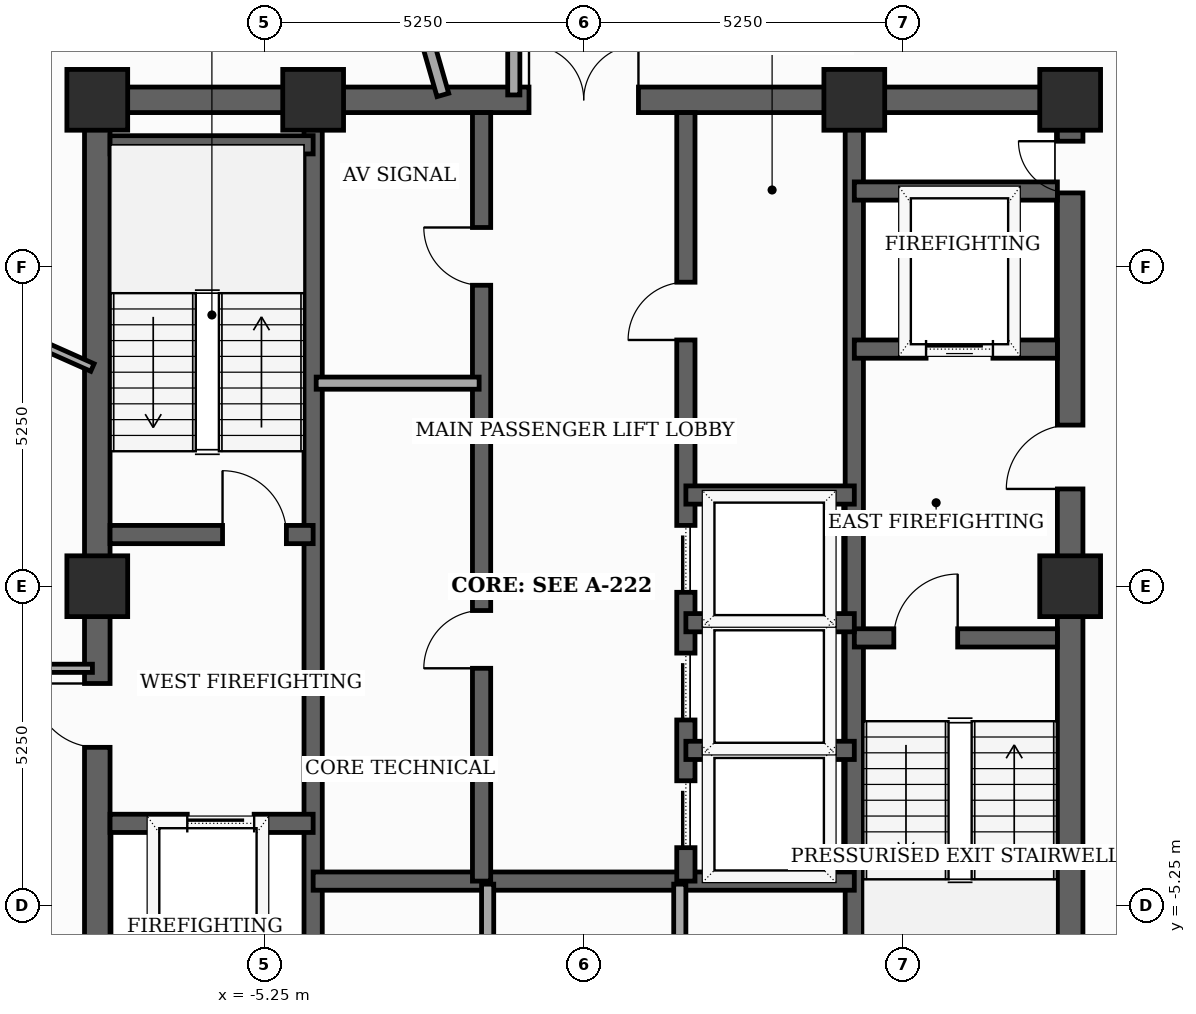
"""IFC4 building model, lengths in metres.
Left out: names, types, materials, properties, quantities, classifications, styles, units other than length and angle.
Written with IfcOpenShell. Run it as: python <this file> out.ifc"""

import sys

from ifc_helpers import new_model, si_unit, direction, frame, frame_2d, origin, origin_2d, place, context, subcontext, project, spatial, rectangle, extrude, element, fill, save


model = new_model("IFC4")
c1 = context("Model", 3, precision=1e-05, world=origin(), true_north=direction((0.0, 1.0)))
c2 = subcontext(c1, "Body", "Model", "MODEL_VIEW")
j1 = project(units=[si_unit("LENGTHUNIT", "METRE"), si_unit("PLANEANGLEUNIT", "RADIAN")], contexts=[c1])
p1 = place(None, origin())
s1 = spatial("IfcSite", under=j1, at=p1, CompositionType="ELEMENT")
p2 = place(p1, origin())
s2 = spatial("IfcBuilding", under=s1, at=p2, CompositionType="ELEMENT")
p3 = place(p2, frame((0.0, 0.0, 298.0)))
s3 = spatial("IfcBuildingStorey", under=s2, at=p3, CompositionType="ELEMENT", Elevation=298.0)
for number, where, z_axis, x_axis in (
    (1, (8.0, 0.0, 0.0), (0.0, 0.0, 1.0), (1.0, 0.0, 0.0)),
    (2, (8.0, 8.0, 0.0), (0.0, 0.0, 1.0), (1.0, 0.0, 0.0)),
    (3, (4.45, 8.0, 0.0), (0.0, 0.0, 1.0), (1.0, 0.0, 0.0)),
    (4, (-4.45, 8.0, 0.0), (0.0, 0.0, 1.0), (1.0, 0.0, 0.0)),
    (5, (-8.0, 8.0, 0.0), (0.0, 0.0, 1.0), (1.0, 0.0, 0.0)),
    (6, (-8.0, 0.0, 0.0), (0.0, 0.0, 1.0), (1.0, 0.0, 0.0)),
):
    element("IfcColumn", number, at=place(p3, frame(where, z_axis=z_axis, x_axis=x_axis)), inside=s3, PredefinedType="COLUMN", context=c2, shape_type="SweptSolid", body=[
        extrude(rectangle(XDim=1.0, YDim=1.0, at=origin_2d()), origin(), (0.0, 0.0, 1.0), 3.7),
    ])
p4 = place(p3, frame((-8.0, -8.0, 0.0), z_axis=(0.0, 0.0, 1.0), x_axis=(0.0, 1.0, 0.0)))
e7 = element("IfcWall", 7, at=p4, inside=s3, PredefinedType="SHEAR", context=c2, shape_type="SweptSolid", body=[
    extrude(rectangle(XDim=16.0, YDim=0.42, at=frame_2d((8.0, 0.0))), origin(), (0.0, 0.0, 1.0), 3.5),
])
p5 = place(p4, frame((0.681, 0.0, 0.0)))
e8 = element("IfcOpeningElement", 8, at=p5, cuts=e7, PredefinedType="OPENING", context=c2, shape_type="SweptSolid", body=[
    extrude(rectangle(XDim=0.85, YDim=2.02, at=frame_2d((0.425, 1.01))), frame((0.0, 0.22, 0.0), z_axis=(0.0, -1.0, 0.0), x_axis=(1.0, 0.0, 0.0)), (0.0, 0.0, 1.0), 0.44),
])
p6 = place(p4, frame((5.35, 0.0, 0.0)))
e9 = element("IfcOpeningElement", 9, at=p6, cuts=e7, PredefinedType="OPENING", context=c2, shape_type="SweptSolid", body=[
    extrude(rectangle(XDim=1.05, YDim=2.15, at=frame_2d((0.525, 1.075))), frame((0.0, 0.22, 0.0), z_axis=(0.0, -1.0, 0.0), x_axis=(1.0, 0.0, 0.0)), (0.0, 0.0, 1.0), 0.44),
])
p7 = place(p3, frame((8.0, -8.0, 0.0), z_axis=(0.0, 0.0, 1.0), x_axis=(0.0, 1.0, 0.0)))
e10 = element("IfcWall", 10, at=p7, inside=s3, PredefinedType="SHEAR", context=c2, shape_type="SweptSolid", body=[
    extrude(rectangle(XDim=16.0, YDim=0.42, at=frame_2d((8.0, 0.0))), origin(), (0.0, 0.0, 1.0), 3.5),
])
p8 = place(p7, frame((9.6, 0.0, 0.0)))
e11 = element("IfcOpeningElement", 11, at=p8, cuts=e10, PredefinedType="OPENING", context=c2, shape_type="SweptSolid", body=[
    extrude(rectangle(XDim=1.05, YDim=2.15, at=frame_2d((0.525, 1.075))), frame((0.0, 0.22, 0.0), z_axis=(0.0, -1.0, 0.0), x_axis=(1.0, 0.0, 0.0)), (0.0, 0.0, 1.0), 0.44),
])
p9 = place(p7, frame((14.469, 0.0, 0.0)))
e12 = element("IfcOpeningElement", 12, at=p9, cuts=e10, PredefinedType="OPENING", context=c2, shape_type="SweptSolid", body=[
    extrude(rectangle(XDim=0.85, YDim=2.02, at=frame_2d((0.425, 1.01))), frame((0.0, 0.22, 0.0), z_axis=(0.0, -1.0, 0.0), x_axis=(1.0, 0.0, 0.0)), (0.0, 0.0, 1.0), 0.44),
])
p10 = place(p3, frame((-8.0, 8.0, 0.0), z_axis=(0.0, 0.0, 1.0), x_axis=(1.0, 0.0, 0.0)))
e13 = element("IfcWall", 13, at=p10, inside=s3, PredefinedType="SHEAR", context=c2, shape_type="SweptSolid", body=[
    extrude(rectangle(XDim=16.0, YDim=0.42, at=frame_2d((8.0, 0.0))), origin(), (0.0, 0.0, 1.0), 3.5),
])
p11 = place(p10, frame((7.1, 0.0, 0.0)))
e14 = element("IfcOpeningElement", 14, at=p11, cuts=e13, PredefinedType="OPENING", context=c2, shape_type="SweptSolid", body=[
    extrude(rectangle(XDim=1.8, YDim=2.15, at=frame_2d((0.9, 1.075))), frame((0.0, 0.22, 0.0), z_axis=(0.0, -1.0, 0.0), x_axis=(1.0, 0.0, 0.0)), (0.0, 0.0, 1.0), 0.44),
])
for number, where, z_axis, x_axis in (
    (15, (-4.45, -7.79, 0.0), (0.0, 0.0, 1.0), (0.0, 1.0, 0.0)),
    (16, (4.45, -7.79, 0.0), (0.0, 0.0, 1.0), (0.0, 1.0, 0.0)),
):
    element("IfcWall", number, at=place(p3, frame(where, z_axis=z_axis, x_axis=x_axis)), inside=s3, PredefinedType="SHEAR", context=c2, shape_type="SweptSolid", body=[
        extrude(rectangle(XDim=15.58, YDim=0.3, at=frame_2d((7.79, 0.0))), origin(), (0.0, 0.0, 1.0), 3.5),
    ])
p12 = place(p3, frame((-7.79, 0.85, 0.0), z_axis=(0.0, 0.0, 1.0), x_axis=(1.0, 0.0, 0.0)))
e17 = element("IfcWall", 17, at=p12, inside=s3, PredefinedType="SHEAR", context=c2, shape_type="SweptSolid", body=[
    extrude(rectangle(XDim=3.34, YDim=0.3, at=frame_2d((1.67, 0.0))), origin(), (0.0, 0.0, 1.0), 3.5),
])
p13 = place(p12, frame((1.85, 0.0, 0.0)))
e18 = element("IfcOpeningElement", 18, at=p13, cuts=e17, PredefinedType="OPENING", context=c2, shape_type="SweptSolid", body=[
    extrude(rectangle(XDim=1.05, YDim=2.15, at=frame_2d((0.525, 1.075))), frame((0.0, 0.16, 0.0), z_axis=(0.0, -1.0, 0.0), x_axis=(1.0, 0.0, 0.0)), (0.0, 0.0, 1.0), 0.32),
])
p14 = place(p3, frame((-7.79, 7.26, 0.0), z_axis=(0.0, 0.0, 1.0), x_axis=(1.0, 0.0, 0.0)))
e19 = element("IfcWall", 19, at=p14, inside=s3, PredefinedType="SHEAR", context=c2, shape_type="SweptSolid", body=[
    extrude(rectangle(XDim=3.34, YDim=0.3, at=frame_2d((1.67, 0.0))), origin(), (0.0, 0.0, 1.0), 3.5),
])
p15 = place(p3, frame((4.45, -0.85, 0.0), z_axis=(0.0, 0.0, 1.0), x_axis=(1.0, 0.0, 0.0)))
e20 = element("IfcWall", 20, at=p15, inside=s3, PredefinedType="SHEAR", context=c2, shape_type="SweptSolid", body=[
    extrude(rectangle(XDim=3.34, YDim=0.3, at=frame_2d((1.67, 0.0))), origin(), (0.0, 0.0, 1.0), 3.5),
])
p16 = place(p15, frame((0.65, 0.0, 0.0)))
e21 = element("IfcOpeningElement", 21, at=p16, cuts=e20, PredefinedType="OPENING", context=c2, shape_type="SweptSolid", body=[
    extrude(rectangle(XDim=1.05, YDim=2.15, at=frame_2d((0.525, 1.075))), frame((0.0, 0.16, 0.0), z_axis=(0.0, -1.0, 0.0), x_axis=(1.0, 0.0, 0.0)), (0.0, 0.0, 1.0), 0.32),
])
p17 = place(p3, frame((-7.79, -3.9, 0.0), z_axis=(0.0, 0.0, 1.0), x_axis=(1.0, 0.0, 0.0)))
e22 = element("IfcWall", 22, at=p17, inside=s3, PredefinedType="SHEAR", context=c2, shape_type="SweptSolid", body=[
    extrude(rectangle(XDim=3.34, YDim=0.3, at=frame_2d((1.67, 0.0))), origin(), (0.0, 0.0, 1.0), 3.5),
])
p18 = place(p17, frame((1.27, 0.0, 0.0)))
e23 = element("IfcOpeningElement", 23, at=p18, cuts=e22, PredefinedType="OPENING", context=c2, shape_type="SweptSolid", body=[
    extrude(rectangle(XDim=1.1, YDim=2.1, at=frame_2d((0.55, 1.05))), frame((0.0, 0.16, 0.0), z_axis=(0.0, -1.0, 0.0), x_axis=(1.0, 0.0, 0.0)), (0.0, 0.0, 1.0), 0.32),
])
p19 = place(p3, frame((4.45, 3.9, 0.0), z_axis=(0.0, 0.0, 1.0), x_axis=(1.0, 0.0, 0.0)))
e24 = element("IfcWall", 24, at=p19, inside=s3, PredefinedType="SHEAR", context=c2, shape_type="SweptSolid", body=[
    extrude(rectangle(XDim=3.34, YDim=0.3, at=frame_2d((1.67, 0.0))), origin(), (0.0, 0.0, 1.0), 3.5),
])
p20 = place(p19, frame((1.18, 0.0, 0.0)))
e25 = element("IfcOpeningElement", 25, at=p20, cuts=e24, PredefinedType="OPENING", context=c2, shape_type="SweptSolid", body=[
    extrude(rectangle(XDim=1.1, YDim=2.1, at=frame_2d((0.55, 1.05))), frame((0.0, 0.16, 0.0), z_axis=(0.0, -1.0, 0.0), x_axis=(1.0, 0.0, 0.0)), (0.0, 0.0, 1.0), 0.32),
])
p21 = place(p3, frame((4.45, 6.5, 0.0), z_axis=(0.0, 0.0, 1.0), x_axis=(1.0, 0.0, 0.0)))
e26 = element("IfcWall", 26, at=p21, inside=s3, PredefinedType="SHEAR", context=c2, shape_type="SweptSolid", body=[
    extrude(rectangle(XDim=3.34, YDim=0.3, at=frame_2d((1.67, 0.0))), origin(), (0.0, 0.0, 1.0), 3.5),
])
p22 = place(p3, frame((-4.45, -4.85, 0.0), z_axis=(0.0, 0.0, 1.0), x_axis=(1.0, 0.0, 0.0)))
e27 = element("IfcWall", 27, at=p22, inside=s3, PredefinedType="SHEAR", context=c2, shape_type="SweptSolid", body=[
    extrude(rectangle(XDim=8.9, YDim=0.3, at=frame_2d((4.45, 0.0))), origin(), (0.0, 0.0, 1.0), 3.5),
])
p23 = place(p3, frame((-1.68, -4.85, 0.0), z_axis=(0.0, 0.0, 1.0), x_axis=(0.0, 1.0, 0.0)))
e28 = element("IfcWall", 28, at=p23, inside=s3, PredefinedType="SHEAR", context=c2, shape_type="SweptSolid", body=[
    extrude(rectangle(XDim=12.64, YDim=0.3, at=frame_2d((6.32, 0.0))), origin(), (0.0, 0.0, 1.0), 3.5),
])
p24 = place(p23, frame((3.5, 0.0, 0.0)))
e29 = element("IfcOpeningElement", 29, at=p24, cuts=e28, PredefinedType="OPENING", context=c2, shape_type="SweptSolid", body=[
    extrude(rectangle(XDim=0.95, YDim=2.1, at=frame_2d((0.475, 1.05))), frame((0.0, 0.16, 0.0), z_axis=(0.0, -1.0, 0.0), x_axis=(1.0, 0.0, 0.0)), (0.0, 0.0, 1.0), 0.32),
])
p25 = place(p23, frame((9.8, 0.0, 0.0)))
e30 = element("IfcOpeningElement", 30, at=p25, cuts=e28, PredefinedType="OPENING", context=c2, shape_type="SweptSolid", body=[
    extrude(rectangle(XDim=0.95, YDim=2.1, at=frame_2d((0.475, 1.05))), frame((0.0, 0.16, 0.0), z_axis=(0.0, -1.0, 0.0), x_axis=(1.0, 0.0, 0.0)), (0.0, 0.0, 1.0), 0.32),
])
p26 = place(p3, frame((1.68, -4.85, 0.0), z_axis=(0.0, 0.0, 1.0), x_axis=(0.0, 1.0, 0.0)))
e31 = element("IfcWall", 31, at=p26, inside=s3, PredefinedType="SHEAR", context=c2, shape_type="SweptSolid", body=[
    extrude(rectangle(XDim=12.64, YDim=0.3, at=frame_2d((6.32, 0.0))), origin(), (0.0, 0.0, 1.0), 3.5),
])
p27 = place(p26, frame((0.55, 0.0, 0.0)))
e32 = element("IfcOpeningElement", 32, at=p27, cuts=e31, PredefinedType="OPENING", context=c2, shape_type="SweptSolid", body=[
    extrude(rectangle(XDim=1.1, YDim=2.1, at=frame_2d((0.55, 1.05))), frame((0.0, 0.16, 0.0), z_axis=(0.0, -1.0, 0.0), x_axis=(1.0, 0.0, 0.0)), (0.0, 0.0, 1.0), 0.32),
])
p28 = place(p26, frame((2.65, 0.0, 0.0)))
e33 = element("IfcOpeningElement", 33, at=p28, cuts=e31, PredefinedType="OPENING", context=c2, shape_type="SweptSolid", body=[
    extrude(rectangle(XDim=1.1, YDim=2.1, at=frame_2d((0.55, 1.05))), frame((0.0, 0.16, 0.0), z_axis=(0.0, -1.0, 0.0), x_axis=(1.0, 0.0, 0.0)), (0.0, 0.0, 1.0), 0.32),
])
p29 = place(p26, frame((4.75, 0.0, 0.0)))
e34 = element("IfcOpeningElement", 34, at=p29, cuts=e31, PredefinedType="OPENING", context=c2, shape_type="SweptSolid", body=[
    extrude(rectangle(XDim=1.1, YDim=2.1, at=frame_2d((0.55, 1.05))), frame((0.0, 0.16, 0.0), z_axis=(0.0, -1.0, 0.0), x_axis=(1.0, 0.0, 0.0)), (0.0, 0.0, 1.0), 0.32),
])
p30 = place(p26, frame((8.9, 0.0, 0.0)))
e35 = element("IfcOpeningElement", 35, at=p30, cuts=e31, PredefinedType="OPENING", context=c2, shape_type="SweptSolid", body=[
    extrude(rectangle(XDim=0.95, YDim=2.1, at=frame_2d((0.475, 1.05))), frame((0.0, 0.16, 0.0), z_axis=(0.0, -1.0, 0.0), x_axis=(1.0, 0.0, 0.0)), (0.0, 0.0, 1.0), 0.32),
])
for number, where, z_axis, x_axis in (
    (36, (1.68, 1.5, 0.0), (0.0, 0.0, 1.0), (1.0, 0.0, 0.0)),
    (37, (1.68, -2.7, 0.0), (0.0, 0.0, 1.0), (1.0, 0.0, 0.0)),
    (38, (1.68, -0.6, 0.0), (0.0, 0.0, 1.0), (1.0, 0.0, 0.0)),
):
    element("IfcWall", number, at=place(p3, frame(where, z_axis=z_axis, x_axis=x_axis)), inside=s3, PredefinedType="SHEAR", context=c2, shape_type="SweptSolid", body=[
        extrude(rectangle(XDim=2.77, YDim=0.3, at=frame_2d((1.385, 0.0))), origin(), (0.0, 0.0, 1.0), 3.5),
    ])
for number, where, z_axis, x_axis in (
    (39, (-1.58, -7.85, 0.0), (0.0, 0.0, 1.0), (0.0, 1.0, 0.0)),
    (40, (1.58, -7.85, 0.0), (0.0, 0.0, 1.0), (0.0, 1.0, 0.0)),
):
    element("IfcWall", number, at=place(p3, frame(where, z_axis=z_axis, x_axis=x_axis)), inside=s3, PredefinedType="SOLIDWALL", context=c2, shape_type="SweptSolid", body=[
        extrude(rectangle(XDim=2.95, YDim=0.2, at=frame_2d((1.475, 0.0))), origin(), (0.0, 0.0, 1.0), 2.885),
    ])
p31 = place(p3, frame((-4.4, 3.34, 0.0), z_axis=(0.0, 0.0, 1.0), x_axis=(1.0, 0.0, 0.0)))
e41 = element("IfcWall", 41, at=p31, inside=s3, PredefinedType="SOLIDWALL", context=c2, shape_type="SweptSolid", body=[
    extrude(rectangle(XDim=2.68, YDim=0.2, at=frame_2d((1.34, 0.0))), origin(), (0.0, 0.0, 1.0), 3.5),
])
p32 = place(p3, frame((-8.08, -1.35, 0.0), z_axis=(0.0, 0.0, 1.0), x_axis=(-1.0, 0.0, 0.0)))
e42 = element("IfcWall", 42, at=p32, inside=s3, PredefinedType="PARTITIONING", context=c2, shape_type="SweptSolid", body=[
    extrude(rectangle(XDim=2.57, YDim=0.135, at=frame_2d((1.285, 0.0))), origin(), (0.0, 0.0, 1.0), 2.885),
])
p33 = place(p3, frame((-1.15, 10.65, 0.0), z_axis=(0.0, 0.0, 1.0), x_axis=(0.0, -1.0, 0.0)))
e43 = element("IfcWall", 43, at=p33, inside=s3, PredefinedType="SOLIDWALL", context=c2, shape_type="SweptSolid", body=[
    extrude(rectangle(XDim=2.57, YDim=0.2, at=frame_2d((1.285, 0.0))), origin(), (0.0, 0.0, 1.0), 2.885),
])
p34 = place(p3, frame((-8.08, 3.597, 0.0), z_axis=(0.0, 0.0, 1.0), x_axis=(-0.913542590258, 0.406743083266, 0.0)))
e44 = element("IfcWall", 44, at=p34, inside=s3, PredefinedType="PARTITIONING", context=c2, shape_type="SweptSolid", body=[
    extrude(rectangle(XDim=18.505, YDim=0.135, at=frame_2d((9.252, 0.0))), origin(), (0.0, 0.0, 1.0), 2.885),
])
p35 = place(p34, frame((8.792, 0.0, 0.0)))
e45 = element("IfcOpeningElement", 45, at=p35, cuts=e44, PredefinedType="OPENING", context=c2, shape_type="SweptSolid", body=[
    extrude(rectangle(XDim=0.92, YDim=2.1, at=frame_2d((0.46, 1.05))), frame((0.0, 0.077, 0.0), z_axis=(0.0, -1.0, 0.0), x_axis=(1.0, 0.0, 0.0)), (0.0, 0.0, 1.0), 0.155),
])
p36 = place(p3, frame((-3.729, 13.005, 0.0), z_axis=(0.0, 0.0, 1.0), x_axis=(0.275658725111, -0.961255568135, 0.0)))
e46 = element("IfcWall", 46, at=p36, inside=s3, PredefinedType="SOLIDWALL", context=c2, shape_type="SweptSolid", body=[
    extrude(rectangle(XDim=5.124, YDim=0.2, at=frame_2d((2.562, 0.0))), origin(), (0.0, 0.0, 1.0), 2.885),
])
p37 = place(p6, origin())
e47 = element("IfcDoor", 47, at=p37, inside=s3, OperationType="SINGLE_SWING_RIGHT", PredefinedType="DOOR", context=c2, shape_type="SweptSolid", body=[
    extrude(rectangle(XDim=1.05, YDim=2.15, at=frame_2d((0.525, 1.075))), frame((0.0, 0.025, 0.0), z_axis=(0.0, -1.0, 0.0), x_axis=(1.0, 0.0, 0.0)), (0.0, 0.0, 1.0), 0.05),
])
fill(e9, e47)
p38 = place(p8, origin())
e48 = element("IfcDoor", 48, at=p38, inside=s3, OperationType="SINGLE_SWING_LEFT", PredefinedType="DOOR", context=c2, shape_type="SweptSolid", body=[
    extrude(rectangle(XDim=1.05, YDim=2.15, at=frame_2d((0.525, 1.075))), frame((0.0, 0.025, 0.0), z_axis=(0.0, -1.0, 0.0), x_axis=(1.0, 0.0, 0.0)), (0.0, 0.0, 1.0), 0.05),
])
fill(e11, e48)
p39 = place(p9, origin())
e49 = element("IfcDoor", 49, at=p39, inside=s3, OperationType="SINGLE_SWING_RIGHT", PredefinedType="TRAPDOOR", context=c2, shape_type="SweptSolid", body=[
    extrude(rectangle(XDim=0.85, YDim=2.02, at=frame_2d((0.425, 1.01))), frame((0.0, 0.025, 0.0), z_axis=(0.0, -1.0, 0.0), x_axis=(1.0, 0.0, 0.0)), (0.0, 0.0, 1.0), 0.05),
])
fill(e12, e49)
p40 = place(p11, origin())
e50 = element("IfcDoor", 50, at=p40, inside=s3, OperationType="DOUBLE_DOOR_SINGLE_SWING", PredefinedType="DOOR", context=c2, shape_type="SweptSolid", body=[
    extrude(rectangle(XDim=1.8, YDim=2.15, at=frame_2d((0.9, 1.075))), frame((0.0, 0.025, 0.0), z_axis=(0.0, -1.0, 0.0), x_axis=(1.0, 0.0, 0.0)), (0.0, 0.0, 1.0), 0.05),
])
fill(e14, e50)
p41 = place(p13, origin())
e51 = element("IfcDoor", 51, at=p41, inside=s3, OperationType="SINGLE_SWING_LEFT", PredefinedType="DOOR", context=c2, shape_type="SweptSolid", body=[
    extrude(rectangle(XDim=1.05, YDim=2.15, at=frame_2d((0.525, 1.075))), frame((0.0, 0.025, 0.0), z_axis=(0.0, -1.0, 0.0), x_axis=(1.0, 0.0, 0.0)), (0.0, 0.0, 1.0), 0.05),
])
fill(e18, e51)
p42 = place(p16, origin())
e52 = element("IfcDoor", 52, at=p42, inside=s3, OperationType="SINGLE_SWING_RIGHT", PredefinedType="DOOR", context=c2, shape_type="SweptSolid", body=[
    extrude(rectangle(XDim=1.05, YDim=2.15, at=frame_2d((0.525, 1.075))), frame((0.0, 0.025, 0.0), z_axis=(0.0, -1.0, 0.0), x_axis=(1.0, 0.0, 0.0)), (0.0, 0.0, 1.0), 0.05),
])
fill(e21, e52)
p43 = place(p18, origin())
e53 = element("IfcDoor", 53, at=p43, inside=s3, OperationType="SLIDING_TO_LEFT", PredefinedType="DOOR", context=c2, shape_type="SweptSolid", body=[
    extrude(rectangle(XDim=1.1, YDim=2.1, at=frame_2d((0.55, 1.05))), frame((0.0, 0.025, 0.0), z_axis=(0.0, -1.0, 0.0), x_axis=(1.0, 0.0, 0.0)), (0.0, 0.0, 1.0), 0.05),
])
fill(e23, e53)
p44 = place(p20, origin())
e54 = element("IfcDoor", 54, at=p44, inside=s3, OperationType="SLIDING_TO_LEFT", PredefinedType="DOOR", context=c2, shape_type="SweptSolid", body=[
    extrude(rectangle(XDim=1.1, YDim=2.1, at=frame_2d((0.55, 1.05))), frame((0.0, 0.025, 0.0), z_axis=(0.0, -1.0, 0.0), x_axis=(1.0, 0.0, 0.0)), (0.0, 0.0, 1.0), 0.05),
])
fill(e25, e54)
p45 = place(p24, origin())
e55 = element("IfcDoor", 55, at=p45, inside=s3, OperationType="SINGLE_SWING_LEFT", PredefinedType="DOOR", context=c2, shape_type="SweptSolid", body=[
    extrude(rectangle(XDim=0.95, YDim=2.1, at=frame_2d((0.475, 1.05))), frame((0.0, 0.025, 0.0), z_axis=(0.0, -1.0, 0.0), x_axis=(1.0, 0.0, 0.0)), (0.0, 0.0, 1.0), 0.05),
])
fill(e29, e55)
p46 = place(p25, origin())
e56 = element("IfcDoor", 56, at=p46, inside=s3, OperationType="SINGLE_SWING_RIGHT", PredefinedType="DOOR", context=c2, shape_type="SweptSolid", body=[
    extrude(rectangle(XDim=0.95, YDim=2.1, at=frame_2d((0.475, 1.05))), frame((0.0, 0.025, 0.0), z_axis=(0.0, -1.0, 0.0), x_axis=(1.0, 0.0, 0.0)), (0.0, 0.0, 1.0), 0.05),
])
fill(e30, e56)
p47 = place(p27, origin())
e57 = element("IfcDoor", 57, at=p47, inside=s3, OperationType="SLIDING_TO_LEFT", PredefinedType="DOOR", context=c2, shape_type="SweptSolid", body=[
    extrude(rectangle(XDim=1.1, YDim=2.1, at=frame_2d((0.55, 1.05))), frame((0.0, 0.025, 0.0), z_axis=(0.0, -1.0, 0.0), x_axis=(1.0, 0.0, 0.0)), (0.0, 0.0, 1.0), 0.05),
])
fill(e32, e57)
p48 = place(p28, origin())
e58 = element("IfcDoor", 58, at=p48, inside=s3, OperationType="SLIDING_TO_LEFT", PredefinedType="DOOR", context=c2, shape_type="SweptSolid", body=[
    extrude(rectangle(XDim=1.1, YDim=2.1, at=frame_2d((0.55, 1.05))), frame((0.0, 0.025, 0.0), z_axis=(0.0, -1.0, 0.0), x_axis=(1.0, 0.0, 0.0)), (0.0, 0.0, 1.0), 0.05),
])
fill(e33, e58)
p49 = place(p29, origin())
e59 = element("IfcDoor", 59, at=p49, inside=s3, OperationType="SLIDING_TO_LEFT", PredefinedType="DOOR", context=c2, shape_type="SweptSolid", body=[
    extrude(rectangle(XDim=1.1, YDim=2.1, at=frame_2d((0.55, 1.05))), frame((0.0, 0.025, 0.0), z_axis=(0.0, -1.0, 0.0), x_axis=(1.0, 0.0, 0.0)), (0.0, 0.0, 1.0), 0.05),
])
fill(e34, e59)
p50 = place(p30, origin())
e60 = element("IfcDoor", 60, at=p50, inside=s3, OperationType="SINGLE_SWING_LEFT", PredefinedType="DOOR", context=c2, shape_type="SweptSolid", body=[
    extrude(rectangle(XDim=0.95, YDim=2.1, at=frame_2d((0.475, 1.05))), frame((0.0, 0.025, 0.0), z_axis=(0.0, -1.0, 0.0), x_axis=(1.0, 0.0, 0.0)), (0.0, 0.0, 1.0), 0.05),
])
fill(e35, e60)
save(model, sys.argv[1])
